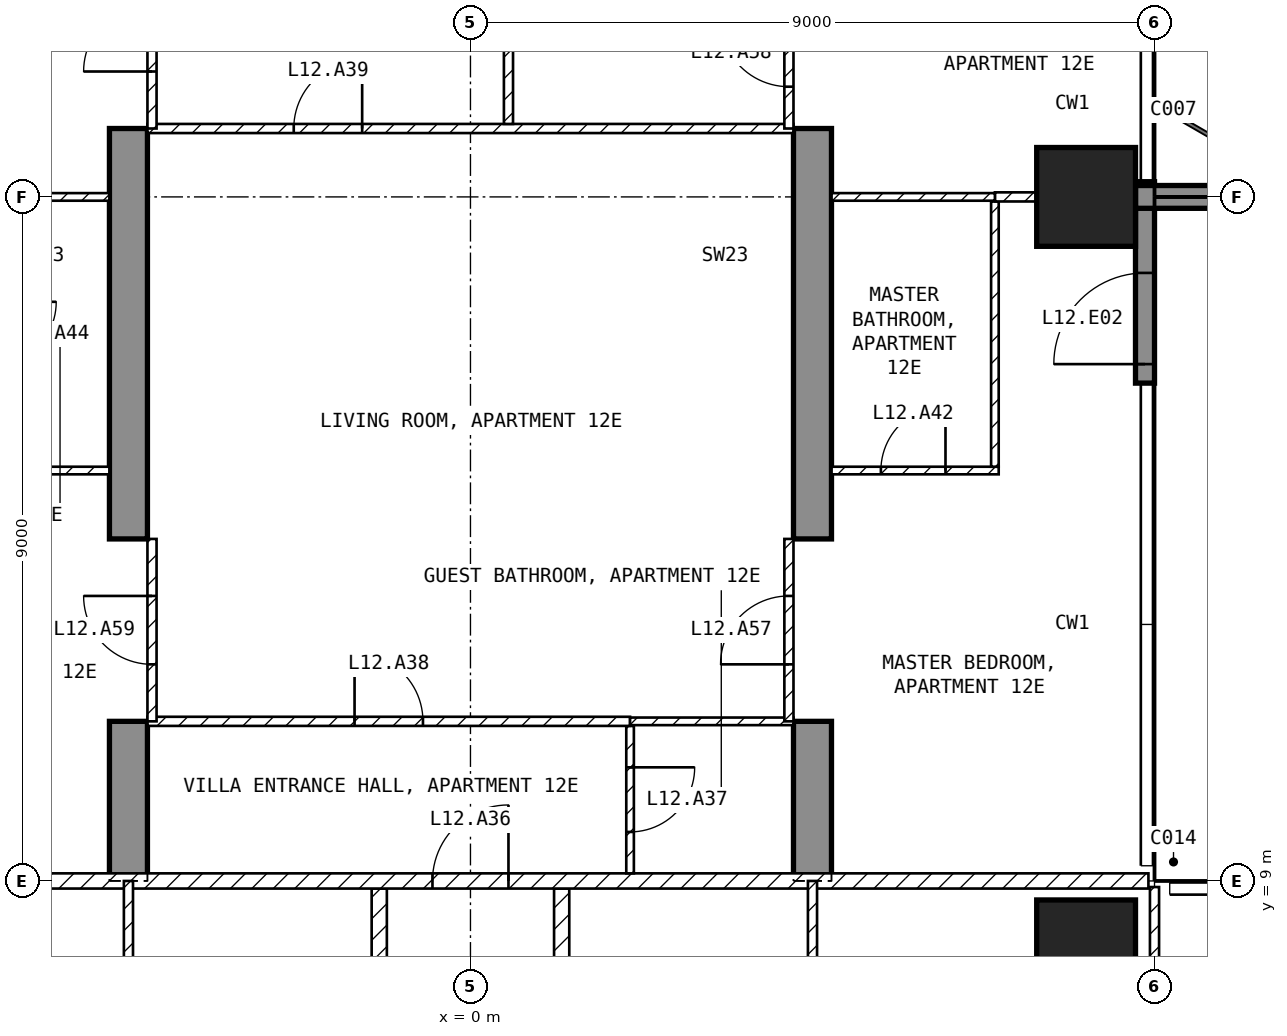
"""IFC4 building model, lengths in metres.
Left out: names, types, materials, properties, quantities, classifications, styles, units other than length and angle.
Written with IfcOpenShell. Run it as: python <this file> out.ifc"""

import sys

from ifc_helpers import new_model, si_unit, direction, frame, frame_2d, origin, origin_2d, place, context, subcontext, project, spatial, polyline, rectangle, outline, extrude, element, fill, save


model = new_model("IFC4")
c1 = context("Model", 3, precision=1e-05, world=origin(), true_north=direction((0.0, 1.0)))
c2 = subcontext(c1, "Body", "Model", "MODEL_VIEW")
j1 = project(units=[si_unit("LENGTHUNIT", "METRE"), si_unit("PLANEANGLEUNIT", "RADIAN")], contexts=[c1])
p1 = place(None, origin())
s1 = spatial("IfcSite", under=j1, at=p1, CompositionType="ELEMENT")
p2 = place(p1, origin())
s2 = spatial("IfcBuilding", under=s1, at=p2, CompositionType="ELEMENT")
p3 = place(p2, frame((0.0, 0.0, 61.0)))
s3 = spatial("IfcBuildingStorey", under=s2, at=p3, CompositionType="ELEMENT", Elevation=61.0)
for number, where, z_axis, x_axis in (
    (1, (8.1, 8.1, -0.25), (0.0, 0.0, 1.0), (1.0, 0.0, 0.0)),
    (2, (8.1, 18.0, -0.25), (0.0, 0.0, 1.0), (1.0, 0.0, 0.0)),
):
    element("IfcColumn", number, at=place(p3, frame(where, z_axis=z_axis, x_axis=x_axis)), inside=s3, PredefinedType="COLUMN", context=c2, shape_type="SweptSolid", body=[
        extrude(rectangle(XDim=1.3, YDim=1.3, at=origin_2d()), origin(), (0.0, 0.0, 1.0), 3.5),
    ])
for number, where, z_axis, x_axis in (
    (3, (-4.75, 9.0, -0.25), (1.0, 0.0, 0.0), (0.0, 1.0, 0.0)),
    (4, (4.25, 9.0, -0.25), (1.0, 0.0, 0.0), (0.0, 1.0, 0.0)),
):
    element("IfcWall", number, at=place(p3, frame(where, z_axis=z_axis, x_axis=x_axis)), inside=s3, PredefinedType="SHEAR", context=c2, shape_type="SweptSolid", body=[
        extrude(outline(polyline([(0.0, 0.0), (2.1, 0.0), (2.1, 2.65), (4.5, 2.65), (4.5, 0.0), (9.9, 0.0), (9.9, 2.65), (12.3, 2.65), (12.3, 0.0), (16.45, 0.0), (16.45, 3.5), (0.0, 3.5), (0.0, 0.0)])), origin(), (0.0, 0.0, 1.0), 0.5),
    ])
p4 = place(p3, frame((8.875, 15.55, 0.0), z_axis=(0.0, 0.0, 1.0), x_axis=(0.0, 1.0, 0.0)))
e5 = element("IfcWall", 5, at=p4, inside=s3, PredefinedType="SOLIDWALL", context=c2, shape_type="SweptSolid", body=[
    extrude(rectangle(XDim=2.65, YDim=0.25, at=frame_2d((1.325, 0.0))), origin(), (0.0, 0.0, 1.0), 3.25),
])
p5 = place(p4, frame((0.25, 0.0, 0.0)))
e6 = element("IfcOpeningElement", 6, at=p5, cuts=e5, PredefinedType="OPENING", context=c2, shape_type="SweptSolid", body=[
    extrude(rectangle(XDim=1.2, YDim=2.4, at=frame_2d((0.6, 1.2))), frame((0.0, 0.135, 0.0), z_axis=(0.0, -1.0, 0.0), x_axis=(1.0, 0.0, 0.0)), (0.0, 0.0, 1.0), 0.27),
])
p6 = place(p3, frame((8.75, 18.0, 0.0), z_axis=(0.0, 0.0, 1.0), x_axis=(1.0, 0.0, 0.0)))
e7 = element("IfcWall", 7, at=p6, inside=s3, PredefinedType="SOLIDWALL", context=c2, shape_type="SweptSolid", body=[
    extrude(rectangle(XDim=2.95, YDim=0.3, at=frame_2d((1.475, 0.0))), origin(), (0.0, 0.0, 1.0), 3.25),
])
for number, where, z_axis, x_axis in (
    (8, (1.2, 8.9, 0.0), (0.0, 0.0, 1.0), (0.0, -1.0, 0.0)),
    (9, (-1.2, 1.3, 0.0), (0.0, 0.0, 1.0), (0.0, 1.0, 0.0)),
):
    element("IfcWall", number, at=place(p3, frame(where, z_axis=z_axis, x_axis=x_axis)), inside=s3, PredefinedType="PARTITIONING", context=c2, shape_type="SweptSolid", body=[
        extrude(rectangle(XDim=7.6, YDim=0.2, at=frame_2d((3.8, 0.0))), origin(), (0.0, 0.0, 1.0), 3.25),
    ])
p7 = place(p3, frame((-8.92, 9.0, 0.0), z_axis=(0.0, 0.0, 1.0), x_axis=(1.0, 0.0, 0.0)))
e10 = element("IfcWall", 10, at=p7, inside=s3, PredefinedType="PARTITIONING", context=c2, shape_type="SweptSolid", body=[
    extrude(rectangle(XDim=17.84, YDim=0.2, at=frame_2d((8.92, 0.0))), origin(), (0.0, 0.0, 1.0), 3.25),
])
p8 = place(p7, frame((8.42, 0.0, 0.0)))
e11 = element("IfcOpeningElement", 11, at=p8, cuts=e10, PredefinedType="OPENING", context=c2, shape_type="SweptSolid", body=[
    extrude(rectangle(XDim=1.0, YDim=2.1, at=frame_2d((0.5, 1.05))), frame((0.0, 0.11, 0.0), z_axis=(0.0, -1.0, 0.0), x_axis=(1.0, 0.0, 0.0)), (0.0, 0.0, 1.0), 0.22),
])
p9 = place(p3, frame((9.0, 1.3, 0.0), z_axis=(0.0, 0.0, 1.0), x_axis=(0.0, 1.0, 0.0)))
e12 = element("IfcWall", 12, at=p9, inside=s3, PredefinedType="PARTITIONING", context=c2, shape_type="SweptSolid", body=[
    extrude(rectangle(XDim=7.62, YDim=0.12, at=frame_2d((3.81, 0.0))), origin(), (0.0, 0.0, 1.0), 3.25),
])
p10 = place(p9, frame((1.15, 0.0, 0.0)))
e13 = element("IfcOpeningElement", 13, at=p10, cuts=e12, PredefinedType="OPENING", context=c2, shape_type="SweptSolid", body=[
    extrude(rectangle(XDim=0.9, YDim=2.1, at=frame_2d((0.45, 1.05))), frame((0.0, 0.07, 0.0), z_axis=(0.0, -1.0, 0.0), x_axis=(1.0, 0.0, 0.0)), (0.0, 0.0, 1.0), 0.14),
])
p11 = place(p3, frame((4.5, 5.1, 0.0), z_axis=(0.0, 0.0, 1.0), x_axis=(0.0, 1.0, 0.0)))
e14 = element("IfcWall", 14, at=p11, inside=s3, PredefinedType="PARTITIONING", context=c2, shape_type="SweptSolid", body=[
    extrude(rectangle(XDim=3.9, YDim=0.12, at=frame_2d((1.95, 0.0))), origin(), (0.0, 0.0, 1.0), 3.25),
])
p12 = place(p11, frame((1.5, 0.0, 0.0)))
e15 = element("IfcOpeningElement", 15, at=p12, cuts=e14, PredefinedType="OPENING", context=c2, shape_type="SweptSolid", body=[
    extrude(rectangle(XDim=0.9, YDim=2.1, at=frame_2d((0.45, 1.05))), frame((0.0, 0.07, 0.0), z_axis=(0.0, -1.0, 0.0), x_axis=(1.0, 0.0, 0.0)), (0.0, 0.0, 1.0), 0.14),
])
p13 = place(p3, frame((-4.5, 9.0, 0.0), z_axis=(0.0, 0.0, 1.0), x_axis=(0.0, -1.0, 0.0)))
e16 = element("IfcWall", 16, at=p13, inside=s3, PredefinedType="PARTITIONING", context=c2, shape_type="SweptSolid", body=[
    extrude(rectangle(XDim=4.68, YDim=0.12, at=frame_2d((2.34, 0.0))), origin(), (0.0, 0.0, 1.0), 3.25),
])
p14 = place(p13, frame((1.89, 0.0, 0.0)))
e17 = element("IfcOpeningElement", 17, at=p14, cuts=e16, PredefinedType="OPENING", context=c2, shape_type="SweptSolid", body=[
    extrude(rectangle(XDim=0.9, YDim=2.1, at=frame_2d((0.45, 1.05))), frame((0.0, 0.07, 0.0), z_axis=(0.0, -1.0, 0.0), x_axis=(1.0, 0.0, 0.0)), (0.0, 0.0, 1.0), 0.14),
])
p15 = place(p3, frame((2.1, 11.04, 0.0), z_axis=(0.0, 0.0, 1.0), x_axis=(0.0, -1.0, 0.0)))
e18 = element("IfcWall", 18, at=p15, inside=s3, PredefinedType="PARTITIONING", context=c2, shape_type="SweptSolid", body=[
    extrude(rectangle(XDim=1.94, YDim=0.1, at=frame_2d((0.97, 0.0))), origin(), (0.0, 0.0, 1.0), 3.25),
])
p16 = place(p15, frame((0.545, 0.0, 0.0)))
e19 = element("IfcOpeningElement", 19, at=p16, cuts=e18, PredefinedType="OPENING", context=c2, shape_type="SweptSolid", body=[
    extrude(rectangle(XDim=0.85, YDim=2.1, at=frame_2d((0.425, 1.05))), frame((0.0, 0.06, 0.0), z_axis=(0.0, -1.0, 0.0), x_axis=(1.0, 0.0, 0.0)), (0.0, 0.0, 1.0), 0.12),
])
p17 = place(p3, frame((-4.25, 11.1, 0.0), z_axis=(0.0, 0.0, 1.0), x_axis=(1.0, 0.0, 0.0)))
e20 = element("IfcWall", 20, at=p17, inside=s3, PredefinedType="PARTITIONING", context=c2, shape_type="SweptSolid", body=[
    extrude(rectangle(XDim=6.35, YDim=0.12, at=frame_2d((3.175, 0.0))), origin(), (0.0, 0.0, 1.0), 3.25),
])
p18 = place(p17, frame((2.725, 0.0, 0.0)))
e21 = element("IfcOpeningElement", 21, at=p18, cuts=e20, PredefinedType="OPENING", context=c2, shape_type="SweptSolid", body=[
    extrude(rectangle(XDim=0.9, YDim=2.1, at=frame_2d((0.45, 1.05))), frame((0.0, 0.07, 0.0), z_axis=(0.0, -1.0, 0.0), x_axis=(1.0, 0.0, 0.0)), (0.0, 0.0, 1.0), 0.14),
])
p19 = place(p3, frame((2.1, 11.1, 0.0), z_axis=(0.0, 0.0, 1.0), x_axis=(1.0, 0.0, 0.0)))
e22 = element("IfcWall", 22, at=p19, inside=s3, PredefinedType="PARTITIONING", context=c2, shape_type="SweptSolid", body=[
    extrude(rectangle(XDim=2.15, YDim=0.1, at=frame_2d((1.075, 0.0))), origin(), (0.0, 0.0, 1.0), 3.25),
])
p20 = place(p3, frame((-4.25, 18.9, 0.0), z_axis=(0.0, 0.0, 1.0), x_axis=(1.0, 0.0, 0.0)))
e23 = element("IfcWall", 23, at=p20, inside=s3, PredefinedType="PARTITIONING", context=c2, shape_type="SweptSolid", body=[
    extrude(rectangle(XDim=8.5, YDim=0.12, at=frame_2d((4.25, 0.0))), origin(), (0.0, 0.0, 1.0), 3.25),
])
p21 = place(p20, frame((1.925, 0.0, 0.0)))
e24 = element("IfcOpeningElement", 24, at=p21, cuts=e23, PredefinedType="OPENING", context=c2, shape_type="SweptSolid", body=[
    extrude(rectangle(XDim=0.9, YDim=2.1, at=frame_2d((0.45, 1.05))), frame((0.0, 0.07, 0.0), z_axis=(0.0, -1.0, 0.0), x_axis=(1.0, 0.0, 0.0)), (0.0, 0.0, 1.0), 0.14),
])
p22 = place(p3, frame((0.5, 23.34, 0.0), z_axis=(0.0, 0.0, 1.0), x_axis=(0.0, -1.0, 0.0)))
e25 = element("IfcWall", 25, at=p22, inside=s3, PredefinedType="PARTITIONING", context=c2, shape_type="SweptSolid", body=[
    extrude(rectangle(XDim=4.38, YDim=0.12, at=frame_2d((2.19, 0.0))), origin(), (0.0, 0.0, 1.0), 3.25),
])
p23 = place(p22, frame((1.74, 0.0, 0.0)))
e26 = element("IfcOpeningElement", 26, at=p23, cuts=e25, PredefinedType="OPENING", context=c2, shape_type="SweptSolid", body=[
    extrude(rectangle(XDim=0.9, YDim=2.1, at=frame_2d((0.45, 1.05))), frame((0.0, 0.07, 0.0), z_axis=(0.0, -1.0, 0.0), x_axis=(1.0, 0.0, 0.0)), (0.0, 0.0, 1.0), 0.14),
])
p24 = place(p3, frame((4.75, 14.4, 0.0), z_axis=(0.0, 0.0, 1.0), x_axis=(1.0, 0.0, 0.0)))
e27 = element("IfcWall", 27, at=p24, inside=s3, PredefinedType="PARTITIONING", context=c2, shape_type="SweptSolid", body=[
    extrude(rectangle(XDim=2.2, YDim=0.1, at=frame_2d((1.1, 0.0))), origin(), (0.0, 0.0, 1.0), 3.25),
])
p25 = place(p24, frame((0.65, 0.0, 0.0)))
e28 = element("IfcOpeningElement", 28, at=p25, cuts=e27, PredefinedType="OPENING", context=c2, shape_type="SweptSolid", body=[
    extrude(rectangle(XDim=0.85, YDim=2.1, at=frame_2d((0.425, 1.05))), frame((0.0, 0.06, 0.0), z_axis=(0.0, -1.0, 0.0), x_axis=(1.0, 0.0, 0.0)), (0.0, 0.0, 1.0), 0.12),
])
p26 = place(p3, frame((6.9, 14.45, 0.0), z_axis=(0.0, 0.0, 1.0), x_axis=(0.0, 1.0, 0.0)))
e29 = element("IfcWall", 29, at=p26, inside=s3, PredefinedType="PARTITIONING", context=c2, shape_type="SweptSolid", body=[
    extrude(rectangle(XDim=3.49, YDim=0.1, at=frame_2d((1.745, 0.0))), origin(), (0.0, 0.0, 1.0), 3.25),
])
p27 = place(p3, frame((6.9, 18.0, 0.0), z_axis=(0.0, 0.0, 1.0), x_axis=(1.0, 0.0, 0.0)))
e30 = element("IfcWall", 30, at=p27, inside=s3, PredefinedType="PARTITIONING", context=c2, shape_type="SweptSolid", body=[
    extrude(rectangle(XDim=0.55, YDim=0.12, at=frame_2d((0.275, 0.0))), origin(), (0.0, 0.0, 1.0), 2.346),
])
p28 = place(p3, frame((4.75, 18.0, 0.0), z_axis=(0.0, 0.0, 1.0), x_axis=(1.0, 0.0, 0.0)))
e31 = element("IfcWall", 31, at=p28, inside=s3, PredefinedType="PARTITIONING", context=c2, shape_type="SweptSolid", body=[
    extrude(rectangle(XDim=2.15, YDim=0.1, at=frame_2d((1.075, 0.0))), origin(), (0.0, 0.0, 1.0), 2.346),
])
p29 = place(p3, frame((-6.35, 14.4, 0.0), z_axis=(0.0, 0.0, 1.0), x_axis=(1.0, 0.0, 0.0)))
e32 = element("IfcWall", 32, at=p29, inside=s3, PredefinedType="PARTITIONING", context=c2, shape_type="SweptSolid", body=[
    extrude(rectangle(XDim=1.6, YDim=0.1, at=frame_2d((0.8, 0.0))), origin(), (0.0, 0.0, 1.0), 3.25),
])
p30 = place(p3, frame((-6.3, 18.0, 0.0), z_axis=(0.0, 0.0, 1.0), x_axis=(1.0, 0.0, 0.0)))
e33 = element("IfcWall", 33, at=p30, inside=s3, PredefinedType="PARTITIONING", context=c2, shape_type="SweptSolid", body=[
    extrude(rectangle(XDim=1.55, YDim=0.1, at=frame_2d((0.775, 0.0))), origin(), (0.0, 0.0, 1.0), 2.346),
])
p31 = place(p3, frame((4.19, 11.1, 0.0), z_axis=(0.0, 0.0, 1.0), x_axis=(0.0, 1.0, 0.0)))
e34 = element("IfcWall", 34, at=p31, inside=s3, PredefinedType="PARTITIONING", context=c2, shape_type="SweptSolid", body=[
    extrude(rectangle(XDim=2.4, YDim=0.12, at=frame_2d((1.2, 0.0))), origin(), (0.0, 0.0, 1.0), 2.4),
])
p32 = place(p31, frame((0.75, 0.0, 0.0)))
e35 = element("IfcOpeningElement", 35, at=p32, cuts=e34, PredefinedType="OPENING", context=c2, shape_type="SweptSolid", body=[
    extrude(rectangle(XDim=0.9, YDim=2.1, at=frame_2d((0.45, 1.05))), frame((0.0, 0.07, 0.0), z_axis=(0.0, -1.0, 0.0), x_axis=(1.0, 0.0, 0.0)), (0.0, 0.0, 1.0), 0.14),
])
p33 = place(p3, frame((4.19, 18.9, 0.0), z_axis=(0.0, 0.0, 1.0), x_axis=(0.0, 1.0, 0.0)))
e36 = element("IfcWall", 36, at=p33, inside=s3, PredefinedType="PARTITIONING", context=c2, shape_type="SweptSolid", body=[
    extrude(rectangle(XDim=2.4, YDim=0.12, at=frame_2d((1.2, 0.0))), origin(), (0.0, 0.0, 1.0), 2.4),
])
p34 = place(p33, frame((0.55, 0.0, 0.0)))
e37 = element("IfcOpeningElement", 37, at=p34, cuts=e36, PredefinedType="OPENING", context=c2, shape_type="SweptSolid", body=[
    extrude(rectangle(XDim=0.9, YDim=2.1, at=frame_2d((0.45, 1.05))), frame((0.0, 0.07, 0.0), z_axis=(0.0, -1.0, 0.0), x_axis=(1.0, 0.0, 0.0)), (0.0, 0.0, 1.0), 0.14),
])
p35 = place(p3, frame((-4.19, 11.1, 0.0), z_axis=(0.0, 0.0, 1.0), x_axis=(0.0, 1.0, 0.0)))
e38 = element("IfcWall", 38, at=p35, inside=s3, PredefinedType="PARTITIONING", context=c2, shape_type="SweptSolid", body=[
    extrude(rectangle(XDim=2.4, YDim=0.12, at=frame_2d((1.2, 0.0))), origin(), (0.0, 0.0, 1.0), 2.4),
])
p36 = place(p35, frame((0.75, 0.0, 0.0)))
e39 = element("IfcOpeningElement", 39, at=p36, cuts=e38, PredefinedType="OPENING", context=c2, shape_type="SweptSolid", body=[
    extrude(rectangle(XDim=0.9, YDim=2.1, at=frame_2d((0.45, 1.05))), frame((0.0, 0.07, 0.0), z_axis=(0.0, -1.0, 0.0), x_axis=(1.0, 0.0, 0.0)), (0.0, 0.0, 1.0), 0.14),
])
p37 = place(p3, frame((-4.19, 18.9, 0.0), z_axis=(0.0, 0.0, 1.0), x_axis=(0.0, 1.0, 0.0)))
e40 = element("IfcWall", 40, at=p37, inside=s3, PredefinedType="PARTITIONING", context=c2, shape_type="SweptSolid", body=[
    extrude(rectangle(XDim=2.4, YDim=0.12, at=frame_2d((1.2, 0.0))), origin(), (0.0, 0.0, 1.0), 2.4),
])
p38 = place(p37, frame((0.75, 0.0, 0.0)))
e41 = element("IfcOpeningElement", 41, at=p38, cuts=e40, PredefinedType="OPENING", context=c2, shape_type="SweptSolid", body=[
    extrude(rectangle(XDim=0.9, YDim=2.1, at=frame_2d((0.45, 1.05))), frame((0.0, 0.07, 0.0), z_axis=(0.0, -1.0, 0.0), x_axis=(1.0, 0.0, 0.0)), (0.0, 0.0, 1.0), 0.14),
])
p39 = place(p5, origin())
e42 = element("IfcDoor", 42, at=p39, inside=s3, OperationType="SINGLE_SWING_LEFT", PredefinedType="DOOR", context=c2, shape_type="SweptSolid", body=[
    extrude(rectangle(XDim=1.2, YDim=2.4, at=frame_2d((0.6, 1.2))), frame((0.0, 0.025, 0.0), z_axis=(0.0, -1.0, 0.0), x_axis=(1.0, 0.0, 0.0)), (0.0, 0.0, 1.0), 0.05),
])
fill(e6, e42)
p40 = place(p8, origin())
e43 = element("IfcDoor", 43, at=p40, inside=s3, OperationType="SINGLE_SWING_RIGHT", PredefinedType="DOOR", context=c2, shape_type="SweptSolid", body=[
    extrude(rectangle(XDim=1.0, YDim=2.1, at=frame_2d((0.5, 1.05))), frame((0.0, 0.025, 0.0), z_axis=(0.0, -1.0, 0.0), x_axis=(1.0, 0.0, 0.0)), (0.0, 0.0, 1.0), 0.05),
])
fill(e11, e43)
p41 = place(p16, origin())
e44 = element("IfcDoor", 44, at=p41, inside=s3, OperationType="SINGLE_SWING_LEFT", PredefinedType="DOOR", context=c2, shape_type="SweptSolid", body=[
    extrude(rectangle(XDim=0.85, YDim=2.1, at=frame_2d((0.425, 1.05))), frame((0.0, 0.025, 0.0), z_axis=(0.0, -1.0, 0.0), x_axis=(1.0, 0.0, 0.0)), (0.0, 0.0, 1.0), 0.05),
])
fill(e19, e44)
p42 = place(p18, origin())
e45 = element("IfcDoor", 45, at=p42, inside=s3, OperationType="SINGLE_SWING_LEFT", PredefinedType="DOOR", context=c2, shape_type="SweptSolid", body=[
    extrude(rectangle(XDim=0.9, YDim=2.1, at=frame_2d((0.45, 1.05))), frame((0.0, 0.025, 0.0), z_axis=(0.0, -1.0, 0.0), x_axis=(1.0, 0.0, 0.0)), (0.0, 0.0, 1.0), 0.05),
])
fill(e21, e45)
p43 = place(p21, origin())
e46 = element("IfcDoor", 46, at=p43, inside=s3, OperationType="SINGLE_SWING_RIGHT", PredefinedType="DOOR", context=c2, shape_type="SweptSolid", body=[
    extrude(rectangle(XDim=0.9, YDim=2.1, at=frame_2d((0.45, 1.05))), frame((0.0, 0.025, 0.0), z_axis=(0.0, -1.0, 0.0), x_axis=(1.0, 0.0, 0.0)), (0.0, 0.0, 1.0), 0.05),
])
fill(e24, e46)
p44 = place(p25, origin())
e47 = element("IfcDoor", 47, at=p44, inside=s3, OperationType="SINGLE_SWING_RIGHT", PredefinedType="DOOR", context=c2, shape_type="SweptSolid", body=[
    extrude(rectangle(XDim=0.85, YDim=2.1, at=frame_2d((0.425, 1.05))), frame((0.0, 0.025, 0.0), z_axis=(0.0, -1.0, 0.0), x_axis=(1.0, 0.0, 0.0)), (0.0, 0.0, 1.0), 0.05),
])
fill(e28, e47)
p45 = place(p32, origin())
e48 = element("IfcDoor", 48, at=p45, inside=s3, OperationType="SINGLE_SWING_LEFT", PredefinedType="DOOR", context=c2, shape_type="SweptSolid", body=[
    extrude(rectangle(XDim=0.9, YDim=2.1, at=frame_2d((0.45, 1.05))), frame((0.0, 0.025, 0.0), z_axis=(0.0, -1.0, 0.0), x_axis=(1.0, 0.0, 0.0)), (0.0, 0.0, 1.0), 0.05),
])
fill(e35, e48)
p46 = place(p34, origin())
e49 = element("IfcDoor", 49, at=p46, inside=s3, OperationType="SINGLE_SWING_RIGHT", PredefinedType="DOOR", context=c2, shape_type="SweptSolid", body=[
    extrude(rectangle(XDim=0.9, YDim=2.1, at=frame_2d((0.45, 1.05))), frame((0.0, 0.025, 0.0), z_axis=(0.0, -1.0, 0.0), x_axis=(1.0, 0.0, 0.0)), (0.0, 0.0, 1.0), 0.05),
])
fill(e37, e49)
p47 = place(p36, origin())
e50 = element("IfcDoor", 50, at=p47, inside=s3, OperationType="SINGLE_SWING_RIGHT", PredefinedType="DOOR", context=c2, shape_type="SweptSolid", body=[
    extrude(rectangle(XDim=0.9, YDim=2.1, at=frame_2d((0.45, 1.05))), frame((0.0, 0.025, 0.0), z_axis=(0.0, -1.0, 0.0), x_axis=(1.0, 0.0, 0.0)), (0.0, 0.0, 1.0), 0.05),
])
fill(e39, e50)
p48 = place(p38, origin())
e51 = element("IfcDoor", 51, at=p48, inside=s3, OperationType="SINGLE_SWING_LEFT", PredefinedType="DOOR", context=c2, shape_type="SweptSolid", body=[
    extrude(rectangle(XDim=0.9, YDim=2.1, at=frame_2d((0.45, 1.05))), frame((0.0, 0.025, 0.0), z_axis=(0.0, -1.0, 0.0), x_axis=(1.0, 0.0, 0.0)), (0.0, 0.0, 1.0), 0.05),
])
fill(e41, e51)
save(model, sys.argv[1])
